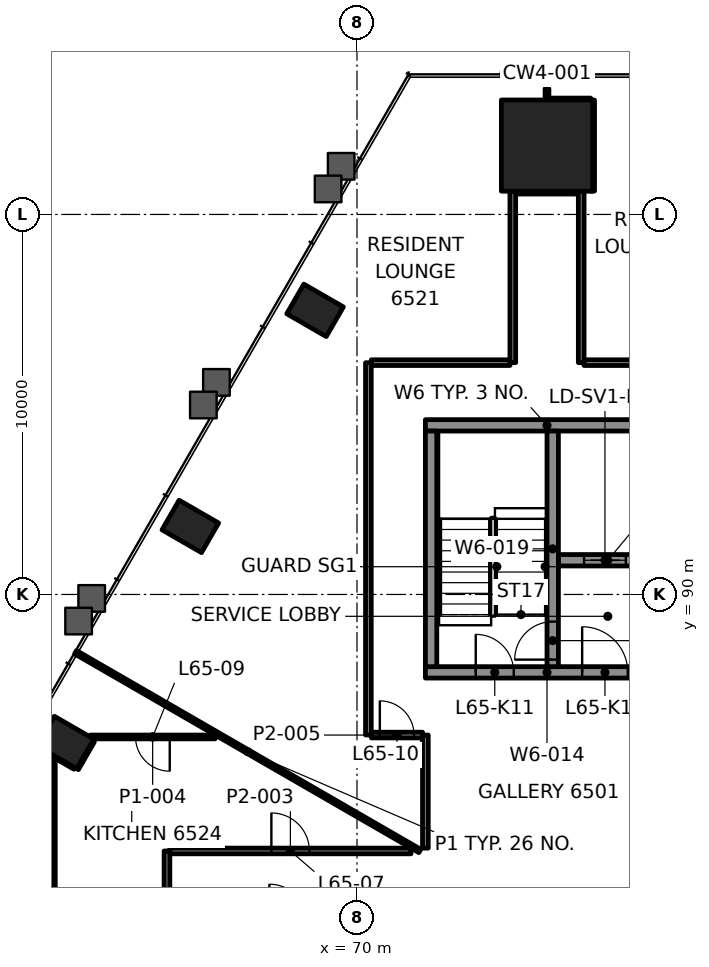
"""IFC4 building model, lengths in metres.
Left out: names, types, materials, properties, quantities, classifications, styles, units other than length and angle.
Written with IfcOpenShell. Run it as: python <this file> out.ifc"""

import sys

from ifc_helpers import new_model, si_unit, direction, frame, frame_2d, origin, origin_2d, place, context, subcontext, project, spatial, rectangle, hollow_rectangle, extrude, element, fill, save


model = new_model("IFC4")
c1 = context("Model", 3, precision=1e-05, world=origin(), true_north=direction((0.0, 1.0)))
c2 = subcontext(c1, "Body", "Model", "MODEL_VIEW")
j1 = project(units=[si_unit("LENGTHUNIT", "METRE"), si_unit("PLANEANGLEUNIT", "RADIAN")], contexts=[c1])
p1 = place(None, origin())
s1 = spatial("IfcSite", under=j1, at=p1, CompositionType="ELEMENT")
p2 = place(p1, origin())
s2 = spatial("IfcBuilding", under=s1, at=p2, CompositionType="ELEMENT")
p3 = place(p2, frame((0.0, 0.0, 274.1)))
s3 = spatial("IfcBuildingStorey", under=s2, at=p3, CompositionType="ELEMENT", Elevation=274.1)
p4 = place(p3, frame((75.0, 101.812, 0.0), z_axis=(0.0, 0.0, 1.0), x_axis=(-1.0, 0.0, 0.0)))
e1 = element("IfcColumn", 1, at=p4, inside=s3, PredefinedType="COLUMN", context=c2, shape_type="SweptSolid", body=[
    extrude(rectangle(XDim=2.4, YDim=2.4, at=origin_2d()), origin(), (0.0, 0.0, 1.0), 3.5),
])
for number, where, z_axis, x_axis in (
    (2, (68.897, 97.476, -0.0), (0.0, 0.0, 1.0), (-0.5, -0.866, 0.0)),
    (3, (65.614, 91.791, -0.0), (0.0, 0.0, 1.0), (-0.5, -0.866, 0.0)),
    (4, (62.332, 86.105, -0.0), (0.0, 0.0, 1.0), (-0.5, -0.866, 0.0)),
):
    element("IfcColumn", number, at=place(p3, frame(where, z_axis=z_axis, x_axis=x_axis)), inside=s3, PredefinedType="COLUMN", context=c2, shape_type="SweptSolid", body=[
        extrude(hollow_rectangle(XDim=0.9, YDim=1.2, WallThickness=0.06, at=origin_2d()), origin(), (0.0, 0.0, 1.0), 3.5),
    ])
p5 = place(p3, frame((71.8, 87.95, 0.0), z_axis=(0.0, 0.0, 1.0), x_axis=(1.0, 0.0, 0.0)))
e5 = element("IfcWall", 5, at=p5, inside=s3, PredefinedType="SHEAR", context=c2, shape_type="SweptSolid", body=[
    extrude(rectangle(XDim=6.4, YDim=0.3, at=frame_2d((3.2, 0.0))), origin(), (0.0, 0.0, 1.0), 3.3),
])
p6 = place(p5, frame((1.325, 0.0, 0.0)))
e6 = element("IfcOpeningElement", 6, at=p6, cuts=e5, PredefinedType="OPENING", context=c2, shape_type="SweptSolid", body=[
    extrude(rectangle(XDim=1.0, YDim=2.1, at=frame_2d((0.5, 1.05))), frame((0.0, 0.16, 0.0), z_axis=(0.0, -1.0, 0.0), x_axis=(1.0, 0.0, 0.0)), (0.0, 0.0, 1.0), 0.32),
])
p7 = place(p5, frame((4.125, 0.0, 0.0)))
e7 = element("IfcOpeningElement", 7, at=p7, cuts=e5, PredefinedType="OPENING", context=c2, shape_type="SweptSolid", body=[
    extrude(rectangle(XDim=1.2, YDim=2.1, at=frame_2d((0.6, 1.05))), frame((0.0, 0.16, 0.0), z_axis=(0.0, -1.0, 0.0), x_axis=(1.0, 0.0, 0.0)), (0.0, 0.0, 1.0), 0.32),
])
p8 = place(p3, frame((71.8, 94.45, 0.0), z_axis=(0.0, 0.0, 1.0), x_axis=(1.0, 0.0, 0.0)))
e8 = element("IfcWall", 8, at=p8, inside=s3, PredefinedType="SHEAR", context=c2, shape_type="SweptSolid", body=[
    extrude(rectangle(XDim=6.4, YDim=0.3, at=frame_2d((3.2, 0.0))), origin(), (0.0, 0.0, 1.0), 3.3),
])
p9 = place(p3, frame((71.95, 88.1, 0.0), z_axis=(0.0, 0.0, 1.0), x_axis=(0.0, 1.0, 0.0)))
e9 = element("IfcWall", 9, at=p9, inside=s3, PredefinedType="SHEAR", context=c2, shape_type="SweptSolid", body=[
    extrude(rectangle(XDim=6.2, YDim=0.3, at=frame_2d((3.1, 0.0))), origin(), (0.0, 0.0, 1.0), 3.3),
])
p10 = place(p3, frame((75.3, 90.9, 0.0), z_axis=(0.0, 0.0, 1.0), x_axis=(1.0, 0.0, 0.0)))
e10 = element("IfcWall", 10, at=p10, inside=s3, PredefinedType="SHEAR", context=c2, shape_type="SweptSolid", body=[
    extrude(rectangle(XDim=2.6, YDim=0.3, at=frame_2d((1.3, 0.0))), origin(), (0.0, 0.0, 1.0), 3.3),
])
p11 = place(p10, frame((0.675, 0.0, 0.0)))
e11 = element("IfcOpeningElement", 11, at=p11, cuts=e10, PredefinedType="OPENING", context=c2, shape_type="SweptSolid", body=[
    extrude(rectangle(XDim=1.1, YDim=2.1, at=frame_2d((0.55, 1.05))), frame((0.0, 0.16, 0.0), z_axis=(0.0, -1.0, 0.0), x_axis=(1.0, 0.0, 0.0)), (0.0, 0.0, 1.0), 0.32),
])
p12 = place(p3, frame((75.15, 88.1, 0.0), z_axis=(0.0, 0.0, 1.0), x_axis=(0.0, 1.0, 0.0)))
e12 = element("IfcWall", 12, at=p12, inside=s3, PredefinedType="SHEAR", context=c2, shape_type="SweptSolid", body=[
    extrude(rectangle(XDim=6.2, YDim=0.3, at=frame_2d((3.1, 0.0))), origin(), (0.0, 0.0, 1.0), 3.3),
])
p13 = place(p12, frame((0.185, 0.0, 0.0)))
e13 = element("IfcOpeningElement", 13, at=p13, cuts=e12, PredefinedType="OPENING", context=c2, shape_type="SweptSolid", body=[
    extrude(rectangle(XDim=1.0, YDim=2.1, at=frame_2d((0.5, 1.05))), frame((0.0, 0.16, 0.0), z_axis=(0.0, -1.0, 0.0), x_axis=(1.0, 0.0, 0.0)), (0.0, 0.0, 1.0), 0.32),
])
p14 = place(p3, frame((65.075, 83.25, 0.0), z_axis=(0.0, 0.0, 1.0), x_axis=(1.0, 0.0, 0.0)))
e14 = element("IfcWall", 14, at=p14, inside=s3, PredefinedType="PARTITIONING", context=c2, shape_type="SweptSolid", body=[
    extrude(rectangle(XDim=6.345, YDim=0.15, at=frame_2d((3.172, 0.0))), origin(), (0.0, 0.0, 1.0), 2.7),
])
p15 = place(p14, frame((2.672, 0.0, 0.0)))
e15 = element("IfcOpeningElement", 15, at=p15, cuts=e14, PredefinedType="OPENING", context=c2, shape_type="SweptSolid", body=[
    extrude(rectangle(XDim=1.0, YDim=2.1, at=frame_2d((0.5, 1.05))), frame((0.0, 0.085, 0.0), z_axis=(0.0, -1.0, 0.0), x_axis=(1.0, 0.0, 0.0)), (0.0, 0.0, 1.0), 0.17),
])
p16 = place(p3, frame((66.267, 86.25, 0.0), z_axis=(0.0, 0.0, 1.0), x_axis=(-1.0, 0.0, 0.0)))
e16 = element("IfcWall", 16, at=p16, inside=s3, PredefinedType="PARTITIONING", context=c2, shape_type="SweptSolid", body=[
    extrude(rectangle(XDim=3.287, YDim=0.1, at=frame_2d((1.644, 0.0))), origin(), (0.0, 0.0, 1.0), 2.7),
])
p17 = place(p16, frame((1.193, 0.0, 0.0)))
e17 = element("IfcOpeningElement", 17, at=p17, cuts=e16, PredefinedType="OPENING", context=c2, shape_type="SweptSolid", body=[
    extrude(rectangle(XDim=0.9, YDim=2.1, at=frame_2d((0.45, 1.05))), frame((0.0, 0.06, 0.0), z_axis=(0.0, -1.0, 0.0), x_axis=(1.0, 0.0, 0.0)), (0.0, 0.0, 1.0), 0.12),
])
p18 = place(p3, frame((70.377, 86.3, 0.0), z_axis=(0.0, 0.0, 1.0), x_axis=(1.0, 0.0, 0.0)))
e18 = element("IfcWall", 18, at=p18, inside=s3, PredefinedType="PARTITIONING", context=c2, shape_type="SweptSolid", body=[
    extrude(rectangle(XDim=1.348, YDim=0.15, at=frame_2d((0.674, 0.0))), origin(), (0.0, 0.0, 1.0), 2.7),
])
p19 = place(p18, frame((0.224, 0.0, 0.0)))
e19 = element("IfcOpeningElement", 19, at=p19, cuts=e18, PredefinedType="OPENING", context=c2, shape_type="SweptSolid", body=[
    extrude(rectangle(XDim=0.9, YDim=2.1, at=frame_2d((0.45, 1.05))), frame((0.0, 0.085, 0.0), z_axis=(0.0, -1.0, 0.0), x_axis=(1.0, 0.0, 0.0)), (0.0, 0.0, 1.0), 0.17),
])
for number, where, z_axis, x_axis in (
    (20, (70.377, 96.1, 0.0), (0.0, 0.0, 1.0), (1.0, 0.0, 0.0)),
    (21, (75.975, 96.1, 0.0), (0.0, 0.0, 1.0), (1.0, 0.0, 0.0)),
):
    element("IfcWall", number, at=place(p3, frame(where, z_axis=z_axis, x_axis=x_axis)), inside=s3, PredefinedType="PARTITIONING", context=c2, shape_type="SweptSolid", body=[
        extrude(rectangle(XDim=3.648, YDim=0.15, at=frame_2d((1.824, 0.0))), origin(), (0.0, 0.0, 1.0), 2.7),
    ])
p20 = place(p3, frame((74.176, 100.612, 0.0), z_axis=(0.0, 0.0, 1.0), x_axis=(1.0, 0.0, 0.0)))
e22 = element("IfcWall", 22, at=p20, inside=s3, PredefinedType="PARTITIONING", context=c2, shape_type="SweptSolid", body=[
    extrude(rectangle(XDim=1.643, YDim=0.15, at=frame_2d((0.821, 0.0))), origin(), (0.0, 0.0, 1.0), 2.697),
])
p21 = place(p3, frame((75.0, 103.012, 0.0), z_axis=(0.0, 0.0, 1.0), x_axis=(1.0, 0.0, 0.0)))
e23 = element("IfcWall", 23, at=p21, inside=s3, PredefinedType="PARTITIONING", context=c2, shape_type="SweptSolid", body=[
    extrude(rectangle(XDim=1.147, YDim=0.1, at=frame_2d((0.574, 0.0))), origin(), (0.0, 0.0, 1.0), 2.7),
])
p22 = place(p3, frame((62.626, 85.415, 0.0), z_axis=(0.0, 0.0, 1.0), x_axis=(0.499973348067, 0.866040790738, 0.0)))
e24 = element("IfcWall", 24, at=p22, inside=s3, PredefinedType="PARTITIONING", context=c2, shape_type="SweptSolid", body=[
    extrude(rectangle(XDim=0.842, YDim=0.1, at=frame_2d((0.421, 0.0))), origin(), (0.0, 0.0, 1.0), 2.7),
])
p23 = place(p3, frame((76.2, 100.614, 0.0), z_axis=(0.0, 0.0, 1.0), x_axis=(0.0, 1.0, 0.0)))
e25 = element("IfcWall", 25, at=p23, inside=s3, PredefinedType="PARTITIONING", context=c2, shape_type="SweptSolid", body=[
    extrude(rectangle(XDim=2.396, YDim=0.1, at=frame_2d((1.198, 0.0))), origin(), (0.0, 0.0, 1.0), 2.7),
])
p24 = place(p3, frame((75.9, 96.1, 0.0), z_axis=(0.0, 0.0, 1.0), x_axis=(0.0, 1.0, 0.0)))
e26 = element("IfcWall", 26, at=p24, inside=s3, PredefinedType="PARTITIONING", context=c2, shape_type="SweptSolid", body=[
    extrude(rectangle(XDim=4.512, YDim=0.15, at=frame_2d((2.256, 0.0))), origin(), (0.0, 0.0, 1.0), 2.7),
])
p25 = place(p3, frame((75.0, 103.062, 0.0), z_axis=(0.0, 0.0, 1.0), x_axis=(0.0, 1.0, 0.0)))
e27 = element("IfcWall", 27, at=p25, inside=s3, PredefinedType="PARTITIONING", context=c2, shape_type="SweptSolid", body=[
    extrude(rectangle(XDim=0.249, YDim=0.1, at=frame_2d((0.125, 0.0))), origin(), (0.0, 0.0, 1.0), 2.7),
])
p26 = place(p3, frame((74.1, 96.1, 0.0), z_axis=(0.0, 0.0, 1.0), x_axis=(0.0, 1.0, 0.0)))
e28 = element("IfcWall", 28, at=p26, inside=s3, PredefinedType="PARTITIONING", context=c2, shape_type="SweptSolid", body=[
    extrude(rectangle(XDim=4.511, YDim=0.15, at=frame_2d((2.256, 0.0))), origin(), (0.0, 0.0, 1.0), 2.7),
])
p27 = place(p3, frame((71.8, 83.325, 0.0), z_axis=(0.0, 0.0, 1.0), x_axis=(0.0, 1.0, 0.0)))
e29 = element("IfcWall", 29, at=p27, inside=s3, PredefinedType="PARTITIONING", context=c2, shape_type="SweptSolid", body=[
    extrude(rectangle(XDim=2.975, YDim=0.15, at=frame_2d((1.488, 0.0))), origin(), (0.0, 0.0, 1.0), 2.697),
])
p28 = place(p3, frame((70.3, 86.302, 0.0), z_axis=(0.0, 0.0, 1.0), x_axis=(0.0, 1.0, 0.0)))
e30 = element("IfcWall", 30, at=p28, inside=s3, PredefinedType="PARTITIONING", context=c2, shape_type="SweptSolid", body=[
    extrude(rectangle(XDim=9.796, YDim=0.15, at=frame_2d((4.898, 0.0))), origin(), (0.0, 0.0, 1.0), 2.7),
])
p29 = place(p3, frame((65.0, 70.352, 0.0), z_axis=(0.0, 0.0, 1.0), x_axis=(0.0, 1.0, 0.0)))
e31 = element("IfcWall", 31, at=p29, inside=s3, PredefinedType="PARTITIONING", context=c2, shape_type="SweptSolid", body=[
    extrude(rectangle(XDim=12.898, YDim=0.15, at=frame_2d((6.449, 0.0))), origin(), (0.0, 0.0, 1.0), 2.7),
])
p30 = place(p3, frame((62.0, 85.776, 0.0), z_axis=(0.0, 0.0, 1.0), x_axis=(0.0, -1.0, 0.0)))
e32 = element("IfcWall", 32, at=p30, inside=s3, PredefinedType="PARTITIONING", context=c2, shape_type="SweptSolid", body=[
    extrude(rectangle(XDim=12.115, YDim=0.12, at=frame_2d((6.058, 0.0))), origin(), (0.0, 0.0, 1.0), 2.688),
])
p31 = place(p30, frame((7.226, 0.0, 0.0)))
e33 = element("IfcOpeningElement", 33, at=p31, cuts=e32, PredefinedType="OPENING", context=c2, shape_type="SweptSolid", body=[
    extrude(rectangle(XDim=0.8, YDim=2.1, at=frame_2d((0.4, 1.05))), frame((0.0, 0.07, 0.0), z_axis=(0.0, -1.0, 0.0), x_axis=(1.0, 0.0, 0.0)), (0.0, 0.0, 1.0), 0.14),
])
p32 = place(p30, frame((10.487, 0.0, 0.0)))
e34 = element("IfcOpeningElement", 34, at=p32, cuts=e32, PredefinedType="OPENING", context=c2, shape_type="SweptSolid", body=[
    extrude(rectangle(XDim=0.9, YDim=2.1, at=frame_2d((0.45, 1.05))), frame((0.0, 0.07, 0.0), z_axis=(0.0, -1.0, 0.0), x_axis=(1.0, 0.0, 0.0)), (0.0, 0.0, 1.0), 0.14),
])
p33 = place(p3, frame((71.653, 83.25, 0.0), z_axis=(0.0, 0.0, 1.0), x_axis=(-0.866025448133, 0.499999923186, 0.0)))
e35 = element("IfcWall", 35, at=p33, inside=s3, PredefinedType="PARTITIONING", context=c2, shape_type="SweptSolid", body=[
    extrude(rectangle(XDim=10.46, YDim=0.1, at=frame_2d((5.23, 0.0))), origin(), (0.0, 0.0, 1.0), 2.688),
])
p34 = place(p3, frame((62.574, 85.445, 0.0), z_axis=(0.0, 0.0, 1.0), x_axis=(-0.866048512801, 0.499959971872, 0.0)))
e36 = element("IfcWall", 36, at=p34, inside=s3, PredefinedType="PARTITIONING", context=c2, shape_type="SweptSolid", body=[
    extrude(rectangle(XDim=0.563, YDim=0.1, at=frame_2d((0.282, 0.0))), origin(), (0.0, 0.0, 1.0), 2.688),
])
p35 = place(p15, origin())
e37 = element("IfcDoor", 37, at=p35, inside=s3, OperationType="SINGLE_SWING_RIGHT", PredefinedType="DOOR", context=c2, shape_type="SweptSolid", body=[
    extrude(rectangle(XDim=1.0, YDim=2.1, at=frame_2d((0.5, 1.05))), frame((0.0, 0.025, 0.0), z_axis=(0.0, -1.0, 0.0), x_axis=(1.0, 0.0, 0.0)), (0.0, 0.0, 1.0), 0.05),
])
fill(e15, e37)
p36 = place(p17, origin())
e38 = element("IfcDoor", 38, at=p36, inside=s3, OperationType="SINGLE_SWING_RIGHT", PredefinedType="DOOR", context=c2, shape_type="SweptSolid", body=[
    extrude(rectangle(XDim=0.9, YDim=2.1, at=frame_2d((0.45, 1.05))), frame((0.0, 0.025, 0.0), z_axis=(0.0, -1.0, 0.0), x_axis=(1.0, 0.0, 0.0)), (0.0, 0.0, 1.0), 0.05),
])
fill(e17, e38)
p37 = place(p19, origin())
e39 = element("IfcDoor", 39, at=p37, inside=s3, OperationType="SINGLE_SWING_RIGHT", PredefinedType="DOOR", context=c2, shape_type="SweptSolid", body=[
    extrude(rectangle(XDim=0.9, YDim=2.1, at=frame_2d((0.45, 1.05))), frame((0.0, 0.025, 0.0), z_axis=(0.0, -1.0, 0.0), x_axis=(1.0, 0.0, 0.0)), (0.0, 0.0, 1.0), 0.05),
])
fill(e19, e39)
p38 = place(p11, origin())
e40 = element("IfcDoor", 40, at=p38, inside=s3, OperationType="DOUBLE_DOOR_SLIDING", PredefinedType="DOOR", context=c2, shape_type="SweptSolid", body=[
    extrude(rectangle(XDim=1.1, YDim=2.1, at=frame_2d((0.55, 1.05))), frame((0.0, 0.025, 0.0), z_axis=(0.0, -1.0, 0.0), x_axis=(1.0, 0.0, 0.0)), (0.0, 0.0, 1.0), 0.05),
])
fill(e11, e40)
p39 = place(p6, origin())
e41 = element("IfcDoor", 41, at=p39, inside=s3, OperationType="SINGLE_SWING_RIGHT", PredefinedType="DOOR", context=c2, shape_type="SweptSolid", body=[
    extrude(rectangle(XDim=1.0, YDim=2.1, at=frame_2d((0.5, 1.05))), frame((0.0, 0.025, 0.0), z_axis=(0.0, -1.0, 0.0), x_axis=(1.0, 0.0, 0.0)), (0.0, 0.0, 1.0), 0.05),
])
fill(e6, e41)
p40 = place(p13, origin())
e42 = element("IfcDoor", 42, at=p40, inside=s3, OperationType="SINGLE_SWING_LEFT", PredefinedType="DOOR", context=c2, shape_type="SweptSolid", body=[
    extrude(rectangle(XDim=1.0, YDim=2.1, at=frame_2d((0.5, 1.05))), frame((0.0, 0.025, 0.0), z_axis=(0.0, -1.0, 0.0), x_axis=(1.0, 0.0, 0.0)), (0.0, 0.0, 1.0), 0.05),
])
fill(e13, e42)
p41 = place(p7, origin())
e43 = element("IfcDoor", 43, at=p41, inside=s3, OperationType="SINGLE_SWING_RIGHT", PredefinedType="DOOR", context=c2, shape_type="SweptSolid", body=[
    extrude(rectangle(XDim=1.2, YDim=2.1, at=frame_2d((0.6, 1.05))), frame((0.0, 0.025, 0.0), z_axis=(0.0, -1.0, 0.0), x_axis=(1.0, 0.0, 0.0)), (0.0, 0.0, 1.0), 0.05),
])
fill(e7, e43)
save(model, sys.argv[1])
